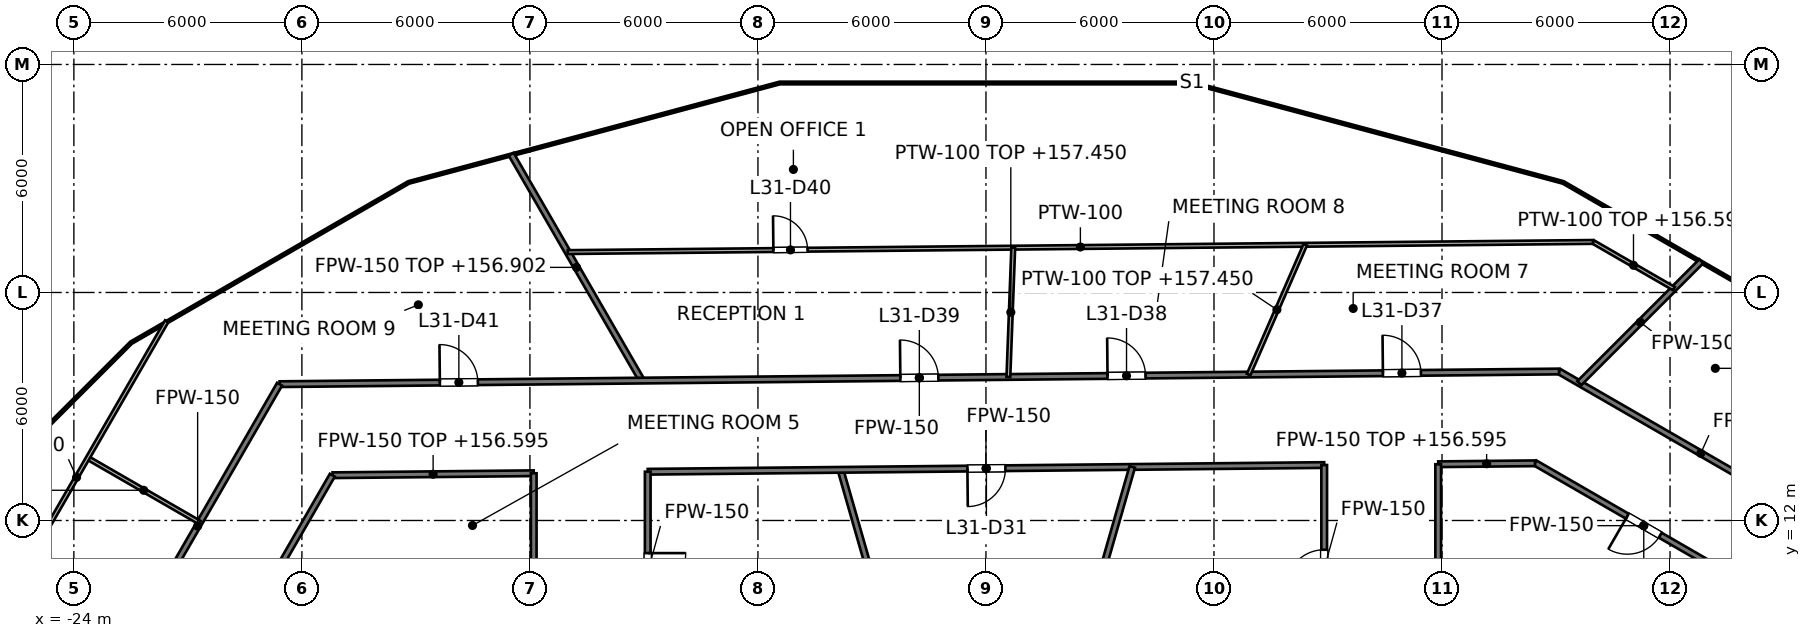
"""IFC4 building model, lengths in metres.
Left out: names, types, materials, properties, quantities, classifications, styles, units other than length and angle.
Written with IfcOpenShell. Run it as: python <this file> out.ifc"""

import sys

from ifc_helpers import new_model, si_unit, direction, frame, frame_2d, origin, place, context, subcontext, project, spatial, rectangle, extrude, element, fill, save


model = new_model("IFC4")
c1 = context("Model", 3, precision=1e-05, world=origin(), true_north=direction((0.0, 1.0)))
c2 = subcontext(c1, "Body", "Model", "MODEL_VIEW")
j1 = project(units=[si_unit("LENGTHUNIT", "METRE"), si_unit("PLANEANGLEUNIT", "RADIAN")], contexts=[c1])
p1 = place(None, origin())
s1 = spatial("IfcSite", under=j1, at=p1, CompositionType="ELEMENT")
p2 = place(p1, origin())
s2 = spatial("IfcBuilding", under=s1, at=p2, CompositionType="ELEMENT")
p3 = place(p2, frame((0.0, 0.0, 153.6)))
s3 = spatial("IfcBuildingStorey", under=s2, at=p3, CompositionType="ELEMENT", Elevation=153.6)
p4 = place(p3, frame((-3.827, 13.333, 0.0), z_axis=(0.0, 0.0, 1.0), x_axis=(0.275935525478, -0.961176147113, 0.0)))
e1 = element("IfcWall", 1, at=p4, inside=s3, PredefinedType="PARTITIONING", context=c2, shape_type="SweptSolid", body=[
    extrude(rectangle(XDim=5.548, YDim=0.15, at=frame_2d((2.774, 0.0))), origin(), (0.0, 0.0, 1.0), 3.85),
])
p5 = place(p3, frame((-12.493, 21.639, 0.0), z_axis=(0.0, 0.0, 1.0), x_axis=(0.499964153563, -0.866046098746, 0.0)))
e2 = element("IfcWall", 2, at=p5, inside=s3, PredefinedType="PARTITIONING", context=c2, shape_type="SweptSolid", body=[
    extrude(rectangle(XDim=6.878, YDim=0.15, at=frame_2d((3.439, 0.0))), origin(), (0.0, 0.0, 1.0), 3.302),
])
p6 = place(p3, frame((14.448, 13.515, 0.0), z_axis=(0.0, 0.0, 1.0), x_axis=(0.865975016585, -0.500087263036, 0.0)))
e3 = element("IfcWall", 3, at=p6, inside=s3, PredefinedType="PARTITIONING", context=c2, shape_type="SweptSolid", body=[
    extrude(rectangle(XDim=6.604, YDim=0.15, at=frame_2d((3.302, 0.0))), origin(), (0.0, 0.0, 1.0), 2.927),
])
p7 = place(p6, frame((2.804, 0.0, 0.0)))
e4 = element("IfcOpeningElement", 4, at=p7, cuts=e3, PredefinedType="OPENING", context=c2, shape_type="SweptSolid", body=[
    extrude(rectangle(XDim=1.0, YDim=2.1, at=frame_2d((0.5, 1.05))), frame((0.0, 0.075, 0.0), z_axis=(0.0, -1.0, 0.0), x_axis=(1.0, 0.0, 0.0)), (0.0, 0.0, 1.0), 0.15),
])
p8 = place(p3, frame((15.08, 15.921, 0.0), z_axis=(0.0, 0.0, 1.0), x_axis=(0.865982112089, -0.50007497592, 0.0)))
e5 = element("IfcWall", 5, at=p8, inside=s3, PredefinedType="PARTITIONING", context=c2, shape_type="SweptSolid", body=[
    extrude(rectangle(XDim=8.613, YDim=0.15, at=frame_2d((4.306, 0.0))), origin(), (0.0, 0.0, 1.0), 2.927),
])
p9 = place(p3, frame((-17.194, 13.191, 0.0), z_axis=(0.0, 0.0, 1.0), x_axis=(0.999950853109, 0.009914200296, 0.0)))
e6 = element("IfcWall", 6, at=p9, inside=s3, PredefinedType="PARTITIONING", context=c2, shape_type="SweptSolid", body=[
    extrude(rectangle(XDim=5.294, YDim=0.15, at=frame_2d((2.647, 0.0))), origin(), (0.0, 0.0, 1.0), 2.995),
])
p10 = place(p3, frame((-8.9, 13.282, 0.0), z_axis=(0.0, 0.0, 1.0), x_axis=(0.999950834077, 0.009916119672, 0.0)))
e7 = element("IfcWall", 7, at=p10, inside=s3, PredefinedType="PARTITIONING", context=c2, shape_type="SweptSolid", body=[
    extrude(rectangle(XDim=17.801, YDim=0.15, at=frame_2d((8.9, 0.0))), origin(), (0.0, 0.0, 1.0), 2.927),
])
p11 = place(p10, frame((8.412, 0.0, 0.0)))
e8 = element("IfcOpeningElement", 8, at=p11, cuts=e7, PredefinedType="OPENING", context=c2, shape_type="SweptSolid", body=[
    extrude(rectangle(XDim=1.0, YDim=2.1, at=frame_2d((0.5, 1.05))), frame((0.0, 0.075, 0.0), z_axis=(0.0, -1.0, 0.0), x_axis=(1.0, 0.0, 0.0)), (0.0, 0.0, 1.0), 0.15),
])
p12 = place(p3, frame((11.9, 13.48, 0.0), z_axis=(0.0, 0.0, 1.0), x_axis=(0.999950357576, 0.009964054536, 0.0)))
e9 = element("IfcWall", 9, at=p12, inside=s3, PredefinedType="PARTITIONING", context=c2, shape_type="SweptSolid", body=[
    extrude(rectangle(XDim=2.548, YDim=0.15, at=frame_2d((1.274, 0.0))), origin(), (0.0, 0.0, 1.0), 2.995),
])
p13 = place(p3, frame((-18.587, 15.587, 0.0), z_axis=(0.0, 0.0, 1.0), x_axis=(0.99995087003, 0.009912493396, 0.0)))
e10 = element("IfcWall", 10, at=p13, inside=s3, PredefinedType="PARTITIONING", context=c2, shape_type="SweptSolid", body=[
    extrude(rectangle(XDim=33.669, YDim=0.15, at=frame_2d((16.834, 0.0))), origin(), (0.0, 0.0, 1.0), 2.927),
])
p14 = place(p13, frame((29.033, 0.0, 0.0)))
e11 = element("IfcOpeningElement", 11, at=p14, cuts=e10, PredefinedType="OPENING", context=c2, shape_type="SweptSolid", body=[
    extrude(rectangle(XDim=1.0, YDim=2.1, at=frame_2d((0.5, 1.05))), frame((0.0, 0.075, 0.0), z_axis=(0.0, -1.0, 0.0), x_axis=(1.0, 0.0, 0.0)), (0.0, 0.0, 1.0), 0.15),
])
p15 = place(p13, frame((21.787, 0.0, 0.0)))
e12 = element("IfcOpeningElement", 12, at=p15, cuts=e10, PredefinedType="OPENING", context=c2, shape_type="SweptSolid", body=[
    extrude(rectangle(XDim=1.0, YDim=2.1, at=frame_2d((0.5, 1.05))), frame((0.0, 0.075, 0.0), z_axis=(0.0, -1.0, 0.0), x_axis=(1.0, 0.0, 0.0)), (0.0, 0.0, 1.0), 0.15),
])
p16 = place(p13, frame((16.335, 0.0, 0.0)))
e13 = element("IfcOpeningElement", 13, at=p16, cuts=e10, PredefinedType="OPENING", context=c2, shape_type="SweptSolid", body=[
    extrude(rectangle(XDim=1.0, YDim=2.1, at=frame_2d((0.5, 1.05))), frame((0.0, 0.075, 0.0), z_axis=(0.0, -1.0, 0.0), x_axis=(1.0, 0.0, 0.0)), (0.0, 0.0, 1.0), 0.15),
])
p17 = place(p13, frame((4.217, 0.0, 0.0)))
e14 = element("IfcOpeningElement", 14, at=p17, cuts=e10, PredefinedType="OPENING", context=c2, shape_type="SweptSolid", body=[
    extrude(rectangle(XDim=1.0, YDim=2.1, at=frame_2d((0.5, 1.05))), frame((0.0, 0.075, 0.0), z_axis=(0.0, -1.0, 0.0), x_axis=(1.0, 0.0, 0.0)), (0.0, 0.0, 1.0), 0.15),
])
p18 = place(p3, frame((15.613, 15.613, 0.0), z_axis=(0.0, 0.0, 1.0), x_axis=(0.707106781187, 0.707106781187, 0.0)))
e15 = element("IfcWall", 15, at=p18, inside=s3, PredefinedType="PARTITIONING", context=c2, shape_type="SweptSolid", body=[
    extrude(rectangle(XDim=4.538, YDim=0.15, at=frame_2d((2.269, 0.0))), origin(), (0.0, 0.0, 1.0), 2.995),
])
p19 = place(p3, frame((-20.5, 7.474, 0.0), z_axis=(0.0, 0.0, 1.0), x_axis=(0.500012665616, 0.866018091164, 0.0)))
e16 = element("IfcWall", 16, at=p19, inside=s3, PredefinedType="PARTITIONING", context=c2, shape_type="SweptSolid", body=[
    extrude(rectangle(XDim=6.602, YDim=0.15, at=frame_2d((3.301, 0.0))), origin(), (0.0, 0.0, 1.0), 2.927),
])
p20 = place(p19, frame((2.803, 0.0, 0.0)))
e17 = element("IfcOpeningElement", 17, at=p20, cuts=e16, PredefinedType="OPENING", context=c2, shape_type="SweptSolid", body=[
    extrude(rectangle(XDim=1.0, YDim=2.1, at=frame_2d((0.5, 1.05))), frame((0.0, 0.075, 0.0), z_axis=(0.0, -1.0, 0.0), x_axis=(1.0, 0.0, 0.0)), (0.0, 0.0, 1.0), 0.15),
])
p21 = place(p3, frame((-22.9, 8.117, 0.0), z_axis=(0.0, 0.0, 1.0), x_axis=(0.5000050195, 0.866022505755, 0.0)))
e18 = element("IfcWall", 18, at=p21, inside=s3, PredefinedType="PARTITIONING", context=c2, shape_type="SweptSolid", body=[
    extrude(rectangle(XDim=8.626, YDim=0.15, at=frame_2d((4.313, 0.0))), origin(), (0.0, 0.0, 1.0), 2.927),
])
p22 = place(p3, frame((2.296, 8.0, 0.0), z_axis=(0.0, 0.0, 1.0), x_axis=(0.275958345059, 0.961169595749, 0.0)))
e19 = element("IfcWall", 19, at=p22, inside=s3, PredefinedType="PARTITIONING", context=c2, shape_type="SweptSolid", body=[
    extrude(rectangle(XDim=5.628, YDim=0.15, at=frame_2d((2.814, 0.0))), origin(), (0.0, 0.0, 1.0), 3.85),
])
p23 = place(p3, frame((11.9, 8.0, 0.0), z_axis=(0.0, 0.0, 1.0), x_axis=(0.0, 1.0, 0.0)))
e20 = element("IfcWall", 20, at=p23, inside=s3, PredefinedType="PARTITIONING", context=c2, shape_type="SweptSolid", body=[
    extrude(rectangle(XDim=5.479, YDim=0.15, at=frame_2d((2.74, 0.0))), origin(), (0.0, 0.0, 1.0), 2.927),
])
p24 = place(p3, frame((8.9, 8.0, 0.0), z_axis=(0.0, 0.0, 1.0), x_axis=(0.0, 1.0, 0.0)))
e21 = element("IfcWall", 21, at=p24, inside=s3, PredefinedType="PARTITIONING", context=c2, shape_type="SweptSolid", body=[
    extrude(rectangle(XDim=5.46, YDim=0.15, at=frame_2d((2.73, 0.0))), origin(), (0.0, 0.0, 1.0), 2.927),
])
p25 = place(p24, frame((2.23, 0.0, 0.0)))
e22 = element("IfcOpeningElement", 22, at=p25, cuts=e21, PredefinedType="OPENING", context=c2, shape_type="SweptSolid", body=[
    extrude(rectangle(XDim=1.0, YDim=2.1, at=frame_2d((0.5, 1.05))), frame((0.0, 0.075, 0.0), z_axis=(0.0, -1.0, 0.0), x_axis=(1.0, 0.0, 0.0)), (0.0, 0.0, 1.0), 0.15),
])
p26 = place(p3, frame((-8.9, 8.0, 0.0), z_axis=(0.0, 0.0, 1.0), x_axis=(0.0, 1.0, 0.0)))
e23 = element("IfcWall", 23, at=p26, inside=s3, PredefinedType="PARTITIONING", context=c2, shape_type="SweptSolid", body=[
    extrude(rectangle(XDim=5.283, YDim=0.15, at=frame_2d((2.642, 0.0))), origin(), (0.0, 0.0, 1.0), 2.927),
])
p27 = place(p26, frame((2.142, 0.0, 0.0)))
e24 = element("IfcOpeningElement", 24, at=p27, cuts=e23, PredefinedType="OPENING", context=c2, shape_type="SweptSolid", body=[
    extrude(rectangle(XDim=1.0, YDim=2.1, at=frame_2d((0.5, 1.05))), frame((0.0, 0.075, 0.0), z_axis=(0.0, -1.0, 0.0), x_axis=(1.0, 0.0, 0.0)), (0.0, 0.0, 1.0), 0.15),
])
p28 = place(p3, frame((-11.9, 8.0, 0.0), z_axis=(0.0, 0.0, 1.0), x_axis=(0.0, 1.0, 0.0)))
e25 = element("IfcWall", 25, at=p28, inside=s3, PredefinedType="PARTITIONING", context=c2, shape_type="SweptSolid", body=[
    extrude(rectangle(XDim=5.243, YDim=0.15, at=frame_2d((2.622, 0.0))), origin(), (0.0, 0.0, 1.0), 2.927),
])
p29 = place(p3, frame((-23.634, 13.645, 0.0), z_axis=(0.0, 0.0, 1.0), x_axis=(0.866002606077, -0.500039484709, 0.0)))
e26 = element("IfcWall", 26, at=p29, inside=s3, PredefinedType="PARTITIONING", context=c2, shape_type="SweptSolid", body=[
    extrude(rectangle(XDim=3.4, YDim=0.1, at=frame_2d((1.7, 0.0))), origin(), (0.0, 0.0, 1.0), 3.152),
])
p30 = place(p3, frame((15.975, 19.33, 0.0), z_axis=(0.0, 0.0, 1.0), x_axis=(0.865977001312, -0.500083826171, 0.0)))
e27 = element("IfcWall", 27, at=p30, inside=s3, PredefinedType="PARTITIONING", context=c2, shape_type="SweptSolid", body=[
    extrude(rectangle(XDim=2.456, YDim=0.1, at=frame_2d((1.228, 0.0))), origin(), (0.0, 0.0, 1.0), 2.995),
])
p31 = place(p3, frame((-11.006, 19.063, 0.0), z_axis=(0.0, 0.0, 1.0), x_axis=(0.999951007424, 0.009898623735, 0.0)))
e28 = element("IfcWall", 28, at=p31, inside=s3, PredefinedType="PARTITIONING", context=c2, shape_type="SweptSolid", body=[
    extrude(rectangle(XDim=26.982, YDim=0.1, at=frame_2d((13.491, 0.0))), origin(), (0.0, 0.0, 1.0), 2.927),
])
p32 = place(p31, frame((5.412, 0.0, 0.0)))
e29 = element("IfcOpeningElement", 29, at=p32, cuts=e28, PredefinedType="OPENING", context=c2, shape_type="SweptSolid", body=[
    extrude(rectangle(XDim=0.9, YDim=2.1, at=frame_2d((0.45, 1.05))), frame((0.0, 0.05, 0.0), z_axis=(0.0, -1.0, 0.0), x_axis=(1.0, 0.0, 0.0)), (0.0, 0.0, 1.0), 0.1),
])
p33 = place(p3, frame((-26.3, 9.028, 0.0), z_axis=(0.0, 0.0, 1.0), x_axis=(0.499994996542, 0.866028292513, 0.0)))
e30 = element("IfcWall", 30, at=p33, inside=s3, PredefinedType="PARTITIONING", context=c2, shape_type="SweptSolid", body=[
    extrude(rectangle(XDim=9.486, YDim=0.1, at=frame_2d((4.743, 0.0))), origin(), (0.0, 0.0, 1.0), 2.927),
])
p34 = place(p3, frame((6.911, 15.84, 0.0), z_axis=(0.0, 0.0, 1.0), x_axis=(0.39992143624, 0.916549423019, 0.0)))
e31 = element("IfcWall", 31, at=p34, inside=s3, PredefinedType="PARTITIONING", context=c2, shape_type="SweptSolid", body=[
    extrude(rectangle(XDim=3.726, YDim=0.1, at=frame_2d((1.863, 0.0))), origin(), (0.0, 0.0, 1.0), 3.85),
])
p35 = place(p3, frame((0.59, 15.778, 0.0), z_axis=(0.0, 0.0, 1.0), x_axis=(0.037590068891, 0.999293243608, 0.0)))
e32 = element("IfcWall", 32, at=p35, inside=s3, PredefinedType="PARTITIONING", context=c2, shape_type="SweptSolid", body=[
    extrude(rectangle(XDim=3.403, YDim=0.1, at=frame_2d((1.702, 0.0))), origin(), (0.0, 0.0, 1.0), 3.85),
])
p36 = place(p7, origin())
e33 = element("IfcDoor", 33, at=p36, inside=s3, OperationType="SINGLE_SWING_LEFT", PredefinedType="DOOR", context=c2, shape_type="SweptSolid", body=[
    extrude(rectangle(XDim=1.0, YDim=2.1, at=frame_2d((0.5, 1.05))), frame((0.0, 0.025, 0.0), z_axis=(0.0, -1.0, 0.0), x_axis=(1.0, 0.0, 0.0)), (0.0, 0.0, 1.0), 0.05),
])
fill(e4, e33)
p37 = place(p25, origin())
e34 = element("IfcDoor", 34, at=p37, inside=s3, OperationType="SINGLE_SWING_LEFT", PredefinedType="DOOR", context=c2, shape_type="SweptSolid", body=[
    extrude(rectangle(XDim=1.0, YDim=2.1, at=frame_2d((0.5, 1.05))), frame((0.0, 0.025, 0.0), z_axis=(0.0, -1.0, 0.0), x_axis=(1.0, 0.0, 0.0)), (0.0, 0.0, 1.0), 0.05),
])
fill(e22, e34)
p38 = place(p11, origin())
e35 = element("IfcDoor", 35, at=p38, inside=s3, OperationType="SINGLE_SWING_LEFT", PredefinedType="DOOR", context=c2, shape_type="SweptSolid", body=[
    extrude(rectangle(XDim=1.0, YDim=2.1, at=frame_2d((0.5, 1.05))), frame((0.0, 0.025, 0.0), z_axis=(0.0, -1.0, 0.0), x_axis=(1.0, 0.0, 0.0)), (0.0, 0.0, 1.0), 0.05),
])
fill(e8, e35)
p39 = place(p27, origin())
e36 = element("IfcDoor", 36, at=p39, inside=s3, OperationType="SINGLE_SWING_RIGHT", PredefinedType="DOOR", context=c2, shape_type="SweptSolid", body=[
    extrude(rectangle(XDim=1.0, YDim=2.1, at=frame_2d((0.5, 1.05))), frame((0.0, 0.025, 0.0), z_axis=(0.0, -1.0, 0.0), x_axis=(1.0, 0.0, 0.0)), (0.0, 0.0, 1.0), 0.05),
])
fill(e24, e36)
p40 = place(p14, origin())
e37 = element("IfcDoor", 37, at=p40, inside=s3, OperationType="SINGLE_SWING_LEFT", PredefinedType="DOOR", context=c2, shape_type="SweptSolid", body=[
    extrude(rectangle(XDim=1.0, YDim=2.1, at=frame_2d((0.5, 1.05))), frame((0.0, 0.025, 0.0), z_axis=(0.0, -1.0, 0.0), x_axis=(1.0, 0.0, 0.0)), (0.0, 0.0, 1.0), 0.05),
])
fill(e11, e37)
p41 = place(p15, origin())
e38 = element("IfcDoor", 38, at=p41, inside=s3, OperationType="SINGLE_SWING_LEFT", PredefinedType="DOOR", context=c2, shape_type="SweptSolid", body=[
    extrude(rectangle(XDim=1.0, YDim=2.1, at=frame_2d((0.5, 1.05))), frame((0.0, 0.025, 0.0), z_axis=(0.0, -1.0, 0.0), x_axis=(1.0, 0.0, 0.0)), (0.0, 0.0, 1.0), 0.05),
])
fill(e12, e38)
p42 = place(p16, origin())
e39 = element("IfcDoor", 39, at=p42, inside=s3, OperationType="SINGLE_SWING_LEFT", PredefinedType="DOOR", context=c2, shape_type="SweptSolid", body=[
    extrude(rectangle(XDim=1.0, YDim=2.1, at=frame_2d((0.5, 1.05))), frame((0.0, 0.025, 0.0), z_axis=(0.0, -1.0, 0.0), x_axis=(1.0, 0.0, 0.0)), (0.0, 0.0, 1.0), 0.05),
])
fill(e13, e39)
p43 = place(p32, origin())
e40 = element("IfcDoor", 40, at=p43, inside=s3, OperationType="SINGLE_SWING_LEFT", PredefinedType="DOOR", context=c2, shape_type="SweptSolid", body=[
    extrude(rectangle(XDim=0.9, YDim=2.1, at=frame_2d((0.45, 1.05))), frame((0.0, 0.025, 0.0), z_axis=(0.0, -1.0, 0.0), x_axis=(1.0, 0.0, 0.0)), (0.0, 0.0, 1.0), 0.05),
])
fill(e29, e40)
p44 = place(p17, origin())
e41 = element("IfcDoor", 41, at=p44, inside=s3, OperationType="SINGLE_SWING_LEFT", PredefinedType="DOOR", context=c2, shape_type="SweptSolid", body=[
    extrude(rectangle(XDim=1.0, YDim=2.1, at=frame_2d((0.5, 1.05))), frame((0.0, 0.025, 0.0), z_axis=(0.0, -1.0, 0.0), x_axis=(1.0, 0.0, 0.0)), (0.0, 0.0, 1.0), 0.05),
])
fill(e14, e41)
save(model, sys.argv[1])
